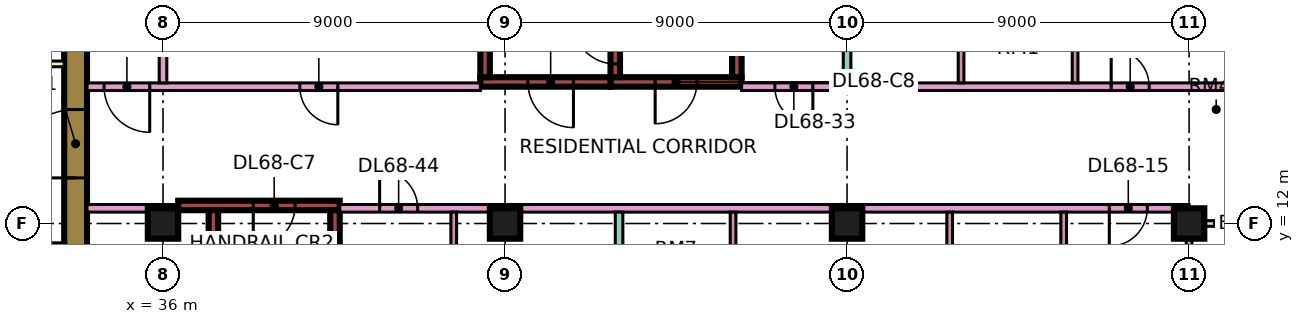
"""IFC4 building model, lengths in metres.
Left out: names, types, materials, properties, quantities, classifications, styles, units other than length and angle.
Written with IfcOpenShell. Run it as: python <this file> out.ifc"""

import sys

from ifc_helpers import new_model, si_unit, direction, frame, frame_2d, origin, origin_2d, place, context, subcontext, project, spatial, rectangle, extrude, element, fill, save


model = new_model("IFC4")
c1 = context("Model", 3, precision=1e-05, world=origin(), true_north=direction((0.0, 1.0)))
c2 = subcontext(c1, "Body", "Model", "MODEL_VIEW")
j1 = project(units=[si_unit("LENGTHUNIT", "METRE"), si_unit("PLANEANGLEUNIT", "RADIAN")], contexts=[c1])
p1 = place(None, origin())
s1 = spatial("IfcSite", under=j1, at=p1, CompositionType="ELEMENT")
p2 = place(p1, origin())
s2 = spatial("IfcBuilding", under=s1, at=p2, CompositionType="ELEMENT")
p3 = place(p2, frame((0.0, 0.0, 292.15)))
s3 = spatial("IfcBuildingStorey", under=s2, at=p3, CompositionType="ELEMENT", Elevation=292.15)
for number, where, z_axis, x_axis in (
    (1, (36.0, 12.0, 0.0), (0.0, 0.0, 1.0), (1.0, 0.0, 0.0)),
    (2, (45.0, 12.0, 0.0), (0.0, 0.0, 1.0), (1.0, 0.0, 0.0)),
    (3, (54.0, 12.0, 0.0), (0.0, 0.0, 1.0), (1.0, 0.0, 0.0)),
    (4, (63.0, 12.0, 0.0), (0.0, 0.0, 1.0), (1.0, 0.0, 0.0)),
):
    element("IfcColumn", number, at=place(p3, frame(where, z_axis=z_axis, x_axis=x_axis)), inside=s3, PredefinedType="COLUMN", context=c2, shape_type="SweptSolid", body=[
        extrude(rectangle(XDim=0.8, YDim=0.8, at=origin_2d()), origin(), (0.0, 0.0, 1.0), 3.75),
    ])
p4 = place(p3, frame((33.7, 7.6, 0.0), z_axis=(0.0, 0.0, 1.0), x_axis=(0.0, 1.0, 0.0)))
e5 = element("IfcWall", 5, at=p4, inside=s3, PredefinedType="SHEAR", context=c2, shape_type="SweptSolid", body=[
    extrude(rectangle(XDim=11.8, YDim=0.6, at=frame_2d((5.9, 0.0))), origin(), (0.0, 0.0, 1.0), 3.75),
])
p5 = place(p4, frame((5.6, 0.0, 0.0)))
e6 = element("IfcOpeningElement", 6, at=p5, cuts=e5, PredefinedType="OPENING", context=c2, shape_type="SweptSolid", body=[
    extrude(rectangle(XDim=1.8, YDim=2.4, at=frame_2d((0.9, 1.2))), frame((0.0, 0.31, 0.0), z_axis=(0.0, -1.0, 0.0), x_axis=(1.0, 0.0, 0.0)), (0.0, 0.0, 1.0), 0.62),
])
p6 = place(p3, frame((36.4, 12.475, 0.0), z_axis=(0.0, 0.0, 1.0), x_axis=(1.0, 0.0, 0.0)))
e7 = element("IfcWall", 7, at=p6, inside=s3, PredefinedType="SHEAR", context=c2, shape_type="SweptSolid", body=[
    extrude(rectangle(XDim=4.25, YDim=0.25, at=frame_2d((2.125, 0.0))), origin(), (0.0, 0.0, 1.0), 3.75),
])
p7 = place(p6, frame((1.975, 0.0, 0.0)))
e8 = element("IfcOpeningElement", 8, at=p7, cuts=e7, PredefinedType="OPENING", context=c2, shape_type="SweptSolid", body=[
    extrude(rectangle(XDim=1.1, YDim=2.2, at=frame_2d((0.55, 1.1))), frame((0.0, 0.135, 0.0), z_axis=(0.0, -1.0, 0.0), x_axis=(1.0, 0.0, 0.0)), (0.0, 0.0, 1.0), 0.27),
])
for number, where, z_axis, x_axis in (
    (9, (37.325, 5.85, 0.0), (0.0, 0.0, 1.0), (0.0, 1.0, 0.0)),
    (10, (40.525, 5.85, 0.0), (0.0, 0.0, 1.0), (0.0, 1.0, 0.0)),
):
    element("IfcWall", number, at=place(p3, frame(where, z_axis=z_axis, x_axis=x_axis)), inside=s3, PredefinedType="SHEAR", context=c2, shape_type="SweptSolid", body=[
        extrude(rectangle(XDim=6.5, YDim=0.25, at=frame_2d((3.25, 0.0))), origin(), (0.0, 0.0, 1.0), 3.75),
    ])
p8 = place(p3, frame((47.775, 15.725, 0.0), z_axis=(0.0, 0.0, 1.0), x_axis=(1.0, 0.0, 0.0)))
e11 = element("IfcWall", 11, at=p8, inside=s3, PredefinedType="SHEAR", context=c2, shape_type="SweptSolid", body=[
    extrude(rectangle(XDim=3.45, YDim=0.25, at=frame_2d((1.725, 0.0))), origin(), (0.0, 0.0, 1.0), 3.75),
])
p9 = place(p8, frame((1.175, 0.0, 0.0)))
e12 = element("IfcOpeningElement", 12, at=p9, cuts=e11, PredefinedType="OPENING", context=c2, shape_type="SweptSolid", body=[
    extrude(rectangle(XDim=1.1, YDim=2.2, at=frame_2d((0.55, 1.1))), frame((0.0, 0.135, 0.0), z_axis=(0.0, -1.0, 0.0), x_axis=(1.0, 0.0, 0.0)), (0.0, 0.0, 1.0), 0.27),
])
p10 = place(p3, frame((47.9, 15.85, 0.0), z_axis=(0.0, 0.0, 1.0), x_axis=(0.0, 1.0, 0.0)))
e13 = element("IfcWall", 13, at=p10, inside=s3, PredefinedType="SHEAR", context=c2, shape_type="SweptSolid", body=[
    extrude(rectangle(XDim=6.5, YDim=0.25, at=frame_2d((3.25, 0.0))), origin(), (0.0, 0.0, 1.0), 3.75),
])
p11 = place(p10, frame((0.35, 0.0, 0.0)))
e14 = element("IfcOpeningElement", 14, at=p11, cuts=e13, PredefinedType="OPENING", context=c2, shape_type="SweptSolid", body=[
    extrude(rectangle(XDim=1.1, YDim=2.2, at=frame_2d((0.55, 1.1))), frame((0.0, 0.135, 0.0), z_axis=(0.0, -1.0, 0.0), x_axis=(1.0, 0.0, 0.0)), (0.0, 0.0, 1.0), 0.27),
])
p12 = place(p3, frame((51.1, 15.85, 0.0), z_axis=(0.0, 0.0, 1.0), x_axis=(0.0, 1.0, 0.0)))
e15 = element("IfcWall", 15, at=p12, inside=s3, PredefinedType="SHEAR", context=c2, shape_type="SweptSolid", body=[
    extrude(rectangle(XDim=6.5, YDim=0.25, at=frame_2d((3.25, 0.0))), origin(), (0.0, 0.0, 1.0), 3.75),
])
p13 = place(p3, frame((44.35, 15.725, 0.0), z_axis=(0.0, 0.0, 1.0), x_axis=(1.0, 0.0, 0.0)))
e16 = element("IfcWall", 16, at=p13, inside=s3, PredefinedType="SHEAR", context=c2, shape_type="SweptSolid", body=[
    extrude(rectangle(XDim=3.425, YDim=0.25, at=frame_2d((1.712, 0.0))), origin(), (0.0, 0.0, 1.0), 3.75),
])
p14 = place(p13, frame((1.25, 0.0, 0.0)))
e17 = element("IfcOpeningElement", 17, at=p14, cuts=e16, PredefinedType="OPENING", context=c2, shape_type="SweptSolid", body=[
    extrude(rectangle(XDim=1.2, YDim=2.2, at=frame_2d((0.6, 1.1))), frame((0.0, 0.135, 0.0), z_axis=(0.0, -1.0, 0.0), x_axis=(1.0, 0.0, 0.0)), (0.0, 0.0, 1.0), 0.27),
])
p15 = place(p3, frame((44.475, 15.85, 0.0), z_axis=(0.0, 0.0, 1.0), x_axis=(0.0, 1.0, 0.0)))
e18 = element("IfcWall", 18, at=p15, inside=s3, PredefinedType="SHEAR", context=c2, shape_type="SweptSolid", body=[
    extrude(rectangle(XDim=6.5, YDim=0.25, at=frame_2d((3.25, 0.0))), origin(), (0.0, 0.0, 1.0), 3.75),
])
p16 = place(p15, frame((1.75, 0.0, 0.0)))
e19 = element("IfcOpeningElement", 19, at=p16, cuts=e18, PredefinedType="OPENING", context=c2, shape_type="SweptSolid", body=[
    extrude(rectangle(XDim=1.1, YDim=2.2, at=frame_2d((0.55, 1.1))), frame((0.0, 0.135, 0.0), z_axis=(0.0, -1.0, 0.0), x_axis=(1.0, 0.0, 0.0)), (0.0, 0.0, 1.0), 0.27),
])
p17 = place(p15, frame((4.3, 0.0, 0.0)))
e20 = element("IfcOpeningElement", 20, at=p17, cuts=e18, PredefinedType="OPENING", context=c2, shape_type="SweptSolid", body=[
    extrude(rectangle(XDim=1.1, YDim=2.2, at=frame_2d((0.55, 1.1))), frame((0.0, 0.135, 0.0), z_axis=(0.0, -1.0, 0.0), x_axis=(1.0, 0.0, 0.0)), (0.0, 0.0, 1.0), 0.27),
])
p18 = place(p3, frame((63.0, 1.575, 0.0), z_axis=(0.0, 0.0, 1.0), x_axis=(0.0, 1.0, 0.0)))
e21 = element("IfcWall", 21, at=p18, inside=s3, PredefinedType="SOLIDWALL", context=c2, shape_type="SweptSolid", body=[
    extrude(rectangle(XDim=10.35, YDim=0.15, at=frame_2d((5.175, 0.0))), origin(), (0.0, 0.0, 1.0), 3.35),
])
p19 = place(p18, frame((1.812, 0.0, 0.0)))
e22 = element("IfcOpeningElement", 22, at=p19, cuts=e21, PredefinedType="OPENING", context=c2, shape_type="SweptSolid", body=[
    extrude(rectangle(XDim=1.8, YDim=2.4, at=frame_2d((0.9, 1.2))), frame((0.0, 0.085, 0.0), z_axis=(0.0, -1.0, 0.0), x_axis=(1.0, 0.0, 0.0)), (0.0, 0.0, 1.0), 0.17),
])
p20 = place(p18, frame((6.175, 0.0, 0.45)))
e23 = element("IfcOpeningElement", 23, at=p20, cuts=e21, PredefinedType="OPENING", context=c2, shape_type="SweptSolid", body=[
    extrude(rectangle(XDim=3.0, YDim=2.4, at=frame_2d((1.5, 1.2))), frame((0.0, 0.085, 0.0), z_axis=(0.0, -1.0, 0.0), x_axis=(1.0, 0.0, 0.0)), (0.0, 0.0, 1.0), 0.17),
])
p21 = place(p3, frame((64.5, 12.0, 0.0), z_axis=(0.0, 0.0, 1.0), x_axis=(-1.0, 0.0, 0.0)))
e24 = element("IfcWall", 24, at=p21, inside=s3, PredefinedType="SOLIDWALL", context=c2, shape_type="SweptSolid", body=[
    extrude(rectangle(XDim=1.5, YDim=0.15, at=frame_2d((0.75, 0.0))), origin(), (0.0, 0.0, 1.0), 3.35),
])
p22 = place(p3, frame((31.4, 16.2, 0.0), z_axis=(0.0, 0.0, 1.0), x_axis=(1.0, 0.0, 0.0)))
e25 = element("IfcWall", 25, at=p22, inside=s3, PredefinedType="PARTITIONING", context=c2, shape_type="SweptSolid", body=[
    extrude(rectangle(XDim=2.0, YDim=0.15, at=frame_2d((1.0, 0.0))), origin(), (0.0, 0.0, 1.0), 3.35),
])
p23 = place(p3, frame((34.0, 12.4, 0.0), z_axis=(0.0, 0.0, 1.0), x_axis=(1.0, 0.0, 0.0)))
e26 = element("IfcWall", 26, at=p23, inside=s3, PredefinedType="PARTITIONING", context=c2, shape_type="SweptSolid", body=[
    extrude(rectangle(XDim=2.401, YDim=0.2, at=frame_2d((1.2, 0.0))), origin(), (0.0, 0.0, 1.0), 3.35),
])
p24 = place(p3, frame((34.0, 15.6, 0.0), z_axis=(0.0, 0.0, 1.0), x_axis=(1.0, 0.0, 0.0)))
e27 = element("IfcWall", 27, at=p24, inside=s3, PredefinedType="PARTITIONING", context=c2, shape_type="SweptSolid", body=[
    extrude(rectangle(XDim=10.35, YDim=0.2, at=frame_2d((5.175, 0.0))), origin(), (0.0, 0.0, 1.0), 3.35),
])
p25 = place(p24, frame((5.6, 0.0, 0.0)))
e28 = element("IfcOpeningElement", 28, at=p25, cuts=e27, PredefinedType="OPENING", context=c2, shape_type="SweptSolid", body=[
    extrude(rectangle(XDim=1.0, YDim=2.1, at=frame_2d((0.5, 1.05))), frame((0.0, 0.11, 0.0), z_axis=(0.0, -1.0, 0.0), x_axis=(1.0, 0.0, 0.0)), (0.0, 0.0, 1.0), 0.22),
])
p26 = place(p24, frame((0.45, 0.0, 0.0)))
e29 = element("IfcOpeningElement", 29, at=p26, cuts=e27, PredefinedType="OPENING", context=c2, shape_type="SweptSolid", body=[
    extrude(rectangle(XDim=1.2, YDim=2.1, at=frame_2d((0.6, 1.05))), frame((0.0, 0.11, 0.0), z_axis=(0.0, -1.0, 0.0), x_axis=(1.0, 0.0, 0.0)), (0.0, 0.0, 1.0), 0.22),
])
p27 = place(p3, frame((36.0, 15.7, 0.0), z_axis=(0.0, 0.0, 1.0), x_axis=(0.0, 1.0, 0.0)))
e30 = element("IfcWall", 30, at=p27, inside=s3, PredefinedType="PARTITIONING", context=c2, shape_type="SweptSolid", body=[
    extrude(rectangle(XDim=8.3, YDim=0.2, at=frame_2d((4.15, 0.0))), origin(), (0.0, 0.0, 1.0), 3.35),
])
p28 = place(p3, frame((40.65, 12.4, 0.0), z_axis=(0.0, 0.0, 1.0), x_axis=(1.0, 0.0, 0.0)))
e31 = element("IfcWall", 31, at=p28, inside=s3, PredefinedType="PARTITIONING", context=c2, shape_type="SweptSolid", body=[
    extrude(rectangle(XDim=22.35, YDim=0.2, at=frame_2d((11.175, 0.0))), origin(), (0.0, 0.0, 1.0), 3.35),
])
p29 = place(p28, frame((20.25, 0.0, 0.0)))
e32 = element("IfcOpeningElement", 32, at=p29, cuts=e31, PredefinedType="OPENING", context=c2, shape_type="SweptSolid", body=[
    extrude(rectangle(XDim=1.0, YDim=2.1, at=frame_2d((0.5, 1.05))), frame((0.0, 0.11, 0.0), z_axis=(0.0, -1.0, 0.0), x_axis=(1.0, 0.0, 0.0)), (0.0, 0.0, 1.0), 0.22),
])
p30 = place(p28, frame((1.05, 0.0, 0.0)))
e33 = element("IfcOpeningElement", 33, at=p30, cuts=e31, PredefinedType="OPENING", context=c2, shape_type="SweptSolid", body=[
    extrude(rectangle(XDim=1.0, YDim=2.1, at=frame_2d((0.5, 1.05))), frame((0.0, 0.11, 0.0), z_axis=(0.0, -1.0, 0.0), x_axis=(1.0, 0.0, 0.0)), (0.0, 0.0, 1.0), 0.22),
])
p31 = place(p3, frame((43.65, 5.825, 0.0), z_axis=(0.0, 0.0, 1.0), x_axis=(0.0, 1.0, 0.0)))
e34 = element("IfcWall", 34, at=p31, inside=s3, PredefinedType="PARTITIONING", context=c2, shape_type="SweptSolid", body=[
    extrude(rectangle(XDim=6.475, YDim=0.15, at=frame_2d((3.238, 0.0))), origin(), (0.0, 0.0, 1.0), 3.35),
])
p32 = place(p31, frame((4.425, 0.0, 0.0)))
e35 = element("IfcOpeningElement", 35, at=p32, cuts=e34, PredefinedType="OPENING", context=c2, shape_type="SweptSolid", body=[
    extrude(rectangle(XDim=0.9, YDim=2.1, at=frame_2d((0.45, 1.05))), frame((0.0, 0.085, 0.0), z_axis=(0.0, -1.0, 0.0), x_axis=(1.0, 0.0, 0.0)), (0.0, 0.0, 1.0), 0.17),
])
p33 = place(p3, frame((48.0, 0.0, 0.0), z_axis=(0.0, 0.0, 1.0), x_axis=(0.0, 1.0, 0.0)))
e36 = element("IfcWall", 36, at=p33, inside=s3, PredefinedType="PARTITIONING", context=c2, shape_type="SweptSolid", body=[
    extrude(rectangle(XDim=12.3, YDim=0.2, at=frame_2d((6.15, 0.0))), origin(), (0.0, 0.0, 1.0), 3.35),
])
p34 = place(p3, frame((51.0, 8.275, 0.0), z_axis=(0.0, 0.0, 1.0), x_axis=(0.0, 1.0, 0.0)))
e37 = element("IfcWall", 37, at=p34, inside=s3, PredefinedType="PARTITIONING", context=c2, shape_type="SweptSolid", body=[
    extrude(rectangle(XDim=4.025, YDim=0.15, at=frame_2d((2.013, 0.0))), origin(), (0.0, 0.0, 1.0), 3.35),
])
p35 = place(p3, frame((51.225, 15.6, 0.0), z_axis=(0.0, 0.0, 1.0), x_axis=(1.0, 0.0, 0.0)))
e38 = element("IfcWall", 38, at=p35, inside=s3, PredefinedType="PARTITIONING", context=c2, shape_type="SweptSolid", body=[
    extrude(rectangle(XDim=13.125, YDim=0.2, at=frame_2d((6.562, 0.0))), origin(), (0.0, 0.0, 1.0), 3.35),
])
p36 = place(p35, frame((9.725, 0.0, 0.0)))
e39 = element("IfcOpeningElement", 39, at=p36, cuts=e38, PredefinedType="OPENING", context=c2, shape_type="SweptSolid", body=[
    extrude(rectangle(XDim=1.0, YDim=2.1, at=frame_2d((0.5, 1.05))), frame((0.0, 0.11, 0.0), z_axis=(0.0, -1.0, 0.0), x_axis=(1.0, 0.0, 0.0)), (0.0, 0.0, 1.0), 0.22),
])
p37 = place(p35, frame((0.875, 0.0, 0.0)))
e40 = element("IfcOpeningElement", 40, at=p37, cuts=e38, PredefinedType="OPENING", context=c2, shape_type="SweptSolid", body=[
    extrude(rectangle(XDim=1.0, YDim=2.1, at=frame_2d((0.5, 1.05))), frame((0.0, 0.11, 0.0), z_axis=(0.0, -1.0, 0.0), x_axis=(1.0, 0.0, 0.0)), (0.0, 0.0, 1.0), 0.22),
])
p38 = place(p3, frame((54.0, 15.7, 0.0), z_axis=(0.0, 0.0, 1.0), x_axis=(0.0, 1.0, 0.0)))
e41 = element("IfcWall", 41, at=p38, inside=s3, PredefinedType="PARTITIONING", context=c2, shape_type="SweptSolid", body=[
    extrude(rectangle(XDim=8.226, YDim=0.2, at=frame_2d((4.113, 0.0))), origin(), (0.0, 0.0, 1.0), 3.35),
])
p39 = place(p3, frame((56.7, 8.275, 0.0), z_axis=(0.0, 0.0, 1.0), x_axis=(0.0, 1.0, 0.0)))
e42 = element("IfcWall", 42, at=p39, inside=s3, PredefinedType="PARTITIONING", context=c2, shape_type="SweptSolid", body=[
    extrude(rectangle(XDim=4.025, YDim=0.15, at=frame_2d((2.013, 0.0))), origin(), (0.0, 0.0, 1.0), 3.35),
])
p40 = place(p3, frame((57.0, 15.7, 0.0), z_axis=(0.0, 0.0, 1.0), x_axis=(0.0, 1.0, 0.0)))
e43 = element("IfcWall", 43, at=p40, inside=s3, PredefinedType="PARTITIONING", context=c2, shape_type="SweptSolid", body=[
    extrude(rectangle(XDim=2.825, YDim=0.15, at=frame_2d((1.413, 0.0))), origin(), (0.0, 0.0, 1.0), 3.35),
])
p41 = place(p3, frame((59.7, 8.275, 0.0), z_axis=(0.0, 0.0, 1.0), x_axis=(0.0, 1.0, 0.0)))
e44 = element("IfcWall", 44, at=p41, inside=s3, PredefinedType="PARTITIONING", context=c2, shape_type="SweptSolid", body=[
    extrude(rectangle(XDim=4.025, YDim=0.15, at=frame_2d((2.013, 0.0))), origin(), (0.0, 0.0, 1.0), 3.35),
])
p42 = place(p3, frame((60.0, 15.7, 0.0), z_axis=(0.0, 0.0, 1.0), x_axis=(0.0, 1.0, 0.0)))
e45 = element("IfcWall", 45, at=p42, inside=s3, PredefinedType="PARTITIONING", context=c2, shape_type="SweptSolid", body=[
    extrude(rectangle(XDim=2.825, YDim=0.15, at=frame_2d((1.413, 0.0))), origin(), (0.0, 0.0, 1.0), 3.35),
])
p43 = place(p5, origin())
e46 = element("IfcDoor", 46, at=p43, inside=s3, OperationType="DOUBLE_DOOR_SINGLE_SWING", PredefinedType="DOOR", context=c2, shape_type="SweptSolid", body=[
    extrude(rectangle(XDim=1.8, YDim=2.4, at=frame_2d((0.9, 1.2))), frame((0.0, 0.025, 0.0), z_axis=(0.0, -1.0, 0.0), x_axis=(1.0, 0.0, 0.0)), (0.0, 0.0, 1.0), 0.05),
])
fill(e6, e46)
p44 = place(p7, frame((1.1, 0.0, 0.0), z_axis=(0.0, 0.0, 1.0), x_axis=(-1.0, 0.0, 0.0)))
e47 = element("IfcDoor", 47, at=p44, inside=s3, OperationType="SINGLE_SWING_LEFT", PredefinedType="DOOR", context=c2, shape_type="SweptSolid", body=[
    extrude(rectangle(XDim=1.1, YDim=2.2, at=frame_2d((0.55, 1.1))), frame((0.0, 0.025, 0.0), z_axis=(0.0, -1.0, 0.0), x_axis=(1.0, 0.0, 0.0)), (0.0, 0.0, 1.0), 0.05),
])
fill(e8, e47)
p45 = place(p9, frame((1.1, 0.0, 0.0), z_axis=(0.0, 0.0, 1.0), x_axis=(-1.0, 0.0, 0.0)))
e48 = element("IfcDoor", 48, at=p45, inside=s3, OperationType="SINGLE_SWING_LEFT", PredefinedType="DOOR", context=c2, shape_type="SweptSolid", body=[
    extrude(rectangle(XDim=1.1, YDim=2.2, at=frame_2d((0.55, 1.1))), frame((0.0, 0.025, 0.0), z_axis=(0.0, -1.0, 0.0), x_axis=(1.0, 0.0, 0.0)), (0.0, 0.0, 1.0), 0.05),
])
fill(e12, e48)
p46 = place(p14, origin())
e49 = element("IfcDoor", 49, at=p46, inside=s3, OperationType="SINGLE_SWING_RIGHT", PredefinedType="DOOR", context=c2, shape_type="SweptSolid", body=[
    extrude(rectangle(XDim=1.2, YDim=2.2, at=frame_2d((0.6, 1.1))), frame((0.0, 0.025, 0.0), z_axis=(0.0, -1.0, 0.0), x_axis=(1.0, 0.0, 0.0)), (0.0, 0.0, 1.0), 0.05),
])
fill(e17, e49)
p47 = place(p11, frame((1.1, 0.0, 0.0), z_axis=(0.0, 0.0, 1.0), x_axis=(-1.0, 0.0, 0.0)))
e50 = element("IfcDoor", 50, at=p47, inside=s3, OperationType="SINGLE_SWING_RIGHT", PredefinedType="DOOR", context=c2, shape_type="SweptSolid", body=[
    extrude(rectangle(XDim=1.1, YDim=2.2, at=frame_2d((0.55, 1.1))), frame((0.0, 0.025, 0.0), z_axis=(0.0, -1.0, 0.0), x_axis=(1.0, 0.0, 0.0)), (0.0, 0.0, 1.0), 0.05),
])
fill(e14, e50)
p48 = place(p25, origin())
e51 = element("IfcDoor", 51, at=p48, inside=s3, OperationType="SINGLE_SWING_RIGHT", PredefinedType="DOOR", context=c2, shape_type="SweptSolid", body=[
    extrude(rectangle(XDim=1.0, YDim=2.1, at=frame_2d((0.5, 1.05))), frame((0.0, 0.025, 0.0), z_axis=(0.0, -1.0, 0.0), x_axis=(1.0, 0.0, 0.0)), (0.0, 0.0, 1.0), 0.05),
])
fill(e28, e51)
p49 = place(p36, origin())
e52 = element("IfcDoor", 52, at=p49, inside=s3, OperationType="SINGLE_SWING_LEFT", PredefinedType="DOOR", context=c2, shape_type="SweptSolid", body=[
    extrude(rectangle(XDim=1.0, YDim=2.1, at=frame_2d((0.5, 1.05))), frame((0.0, 0.025, 0.0), z_axis=(0.0, -1.0, 0.0), x_axis=(1.0, 0.0, 0.0)), (0.0, 0.0, 1.0), 0.05),
])
fill(e39, e52)
p50 = place(p29, frame((1.0, 0.0, 0.0), z_axis=(0.0, 0.0, 1.0), x_axis=(-1.0, 0.0, 0.0)))
e53 = element("IfcDoor", 53, at=p50, inside=s3, OperationType="SINGLE_SWING_LEFT", PredefinedType="DOOR", context=c2, shape_type="SweptSolid", body=[
    extrude(rectangle(XDim=1.0, YDim=2.1, at=frame_2d((0.5, 1.05))), frame((0.0, 0.025, 0.0), z_axis=(0.0, -1.0, 0.0), x_axis=(1.0, 0.0, 0.0)), (0.0, 0.0, 1.0), 0.05),
])
fill(e32, e53)
p51 = place(p26, origin())
e54 = element("IfcDoor", 54, at=p51, inside=s3, OperationType="SINGLE_SWING_RIGHT", PredefinedType="DOOR", context=c2, shape_type="SweptSolid", body=[
    extrude(rectangle(XDim=1.2, YDim=2.1, at=frame_2d((0.6, 1.05))), frame((0.0, 0.025, 0.0), z_axis=(0.0, -1.0, 0.0), x_axis=(1.0, 0.0, 0.0)), (0.0, 0.0, 1.0), 0.05),
])
fill(e29, e54)
p52 = place(p37, origin())
e55 = element("IfcDoor", 55, at=p52, inside=s3, OperationType="SINGLE_SWING_RIGHT", PredefinedType="DOOR", context=c2, shape_type="SweptSolid", body=[
    extrude(rectangle(XDim=1.0, YDim=2.1, at=frame_2d((0.5, 1.05))), frame((0.0, 0.025, 0.0), z_axis=(0.0, -1.0, 0.0), x_axis=(1.0, 0.0, 0.0)), (0.0, 0.0, 1.0), 0.05),
])
fill(e40, e55)
p53 = place(p30, origin())
e56 = element("IfcDoor", 56, at=p53, inside=s3, OperationType="SINGLE_SWING_LEFT", PredefinedType="DOOR", context=c2, shape_type="SweptSolid", body=[
    extrude(rectangle(XDim=1.0, YDim=2.1, at=frame_2d((0.5, 1.05))), frame((0.0, 0.025, 0.0), z_axis=(0.0, -1.0, 0.0), x_axis=(1.0, 0.0, 0.0)), (0.0, 0.0, 1.0), 0.05),
])
fill(e33, e56)
save(model, sys.argv[1])
